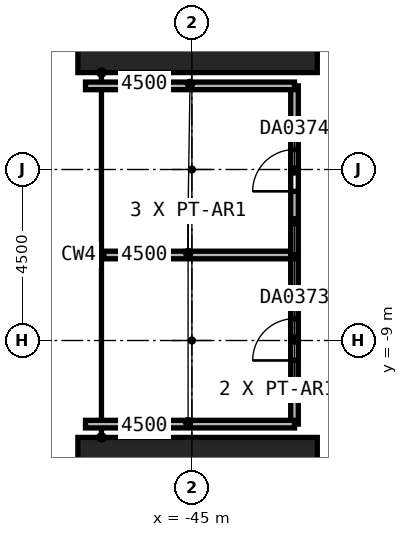
"""IFC4 building model, lengths in metres.
Left out: names, types, materials, properties, quantities, classifications, styles, units other than length and angle.
Written with IfcOpenShell. Run it as: python <this file> out.ifc"""

import sys

from ifc_helpers import new_model, si_unit, direction, frame, frame_2d, origin, origin_2d, place, context, subcontext, project, spatial, rectangle, extrude, element, fill, save


model = new_model("IFC4")
c1 = context("Model", 3, precision=1e-05, world=origin(), true_north=direction((0.0, 1.0)))
c2 = subcontext(c1, "Body", "Model", "MODEL_VIEW")
j1 = project(units=[si_unit("LENGTHUNIT", "METRE"), si_unit("PLANEANGLEUNIT", "RADIAN")], contexts=[c1])
p1 = place(None, origin())
s1 = spatial("IfcSite", under=j1, at=p1, CompositionType="ELEMENT")
p2 = place(p1, origin())
s2 = spatial("IfcBuilding", under=s1, at=p2, CompositionType="ELEMENT")
p3 = place(p2, frame((0.0, 0.0, 19.0)))
s3 = spatial("IfcBuildingStorey", under=s2, at=p3, CompositionType="ELEMENT", Elevation=19.0)
for number, where, z_axis, x_axis in (
    (1, (-44.85, -13.5, 0.0), (0.0, 0.0, 1.0), (0.0, 1.0, 0.0)),
    (2, (-44.85, 0.0, 0.0), (0.0, 0.0, 1.0), (0.0, 1.0, 0.0)),
):
    element("IfcColumn", number, at=place(p3, frame(where, z_axis=z_axis, x_axis=x_axis)), inside=s3, PredefinedType="COLUMN", context=c2, shape_type="SweptSolid", body=[
        extrude(rectangle(XDim=3.9, YDim=6.3, at=origin_2d()), origin(), (0.0, 0.0, 1.0), 6.0),
    ])
p4 = place(p3, frame((-42.3, -11.2, 0.0), z_axis=(0.0, 0.0, 1.0), x_axis=(0.0, 1.0, 0.0)))
e3 = element("IfcWall", 3, at=p4, inside=s3, PredefinedType="PARTITIONING", context=c2, shape_type="SweptSolid", body=[
    extrude(rectangle(XDim=4.45, YDim=0.2, at=frame_2d((2.225, 0.0))), origin(), (0.0, 0.0, 1.0), 4.5),
])
p5 = place(p4, frame((1.675, 0.0, 0.0)))
e4 = element("IfcOpeningElement", 4, at=p5, cuts=e3, PredefinedType="OPENING", context=c2, shape_type="SweptSolid", body=[
    extrude(rectangle(XDim=1.1, YDim=2.4, at=frame_2d((0.55, 1.2))), frame((0.0, 0.1, 0.0), z_axis=(0.0, -1.0, 0.0), x_axis=(1.0, 0.0, 0.0)), (0.0, 0.0, 1.0), 0.2),
])
for number, where, z_axis, x_axis in (
    (5, (-42.3, -11.2, 0.0), (0.0, 0.0, 1.0), (-1.0, 0.0, 0.0)),
    (6, (-47.8, -6.75, 0.0), (0.0, 0.0, 1.0), (1.0, 0.0, 0.0)),
):
    element("IfcWall", number, at=place(p3, frame(where, z_axis=z_axis, x_axis=x_axis)), inside=s3, PredefinedType="PARTITIONING", context=c2, shape_type="SweptSolid", body=[
        extrude(rectangle(XDim=5.5, YDim=0.2, at=frame_2d((2.75, 0.0))), origin(), (0.0, 0.0, 1.0), 5.7),
    ])
p6 = place(p3, frame((-42.3, -6.75, 0.0), z_axis=(0.0, 0.0, 1.0), x_axis=(0.0, 1.0, 0.0)))
e7 = element("IfcWall", 7, at=p6, inside=s3, PredefinedType="PARTITIONING", context=c2, shape_type="SweptSolid", body=[
    extrude(rectangle(XDim=4.45, YDim=0.2, at=frame_2d((2.225, 0.0))), origin(), (0.0, 0.0, 1.0), 4.5),
])
p7 = place(p6, frame((1.675, 0.0, 0.0)))
e8 = element("IfcOpeningElement", 8, at=p7, cuts=e7, PredefinedType="OPENING", context=c2, shape_type="SweptSolid", body=[
    extrude(rectangle(XDim=1.1, YDim=2.4, at=frame_2d((0.55, 1.2))), frame((0.0, 0.1, 0.0), z_axis=(0.0, -1.0, 0.0), x_axis=(1.0, 0.0, 0.0)), (0.0, 0.0, 1.0), 0.2),
])
p8 = place(p3, frame((-42.3, -2.3, 0.0), z_axis=(0.0, 0.0, 1.0), x_axis=(-1.0, 0.0, 0.0)))
e9 = element("IfcWall", 9, at=p8, inside=s3, PredefinedType="PARTITIONING", context=c2, shape_type="SweptSolid", body=[
    extrude(rectangle(XDim=5.5, YDim=0.2, at=frame_2d((2.75, 0.0))), origin(), (0.0, 0.0, 1.0), 5.7),
])
p9 = place(p5, origin())
e10 = element("IfcDoor", 10, at=p9, inside=s3, OperationType="DOUBLE_DOOR_SINGLE_SWING", PredefinedType="DOOR", context=c2, shape_type="SweptSolid", body=[
    extrude(rectangle(XDim=1.1, YDim=2.4, at=frame_2d((0.55, 1.2))), frame((0.0, 0.025, 0.0), z_axis=(0.0, -1.0, 0.0), x_axis=(1.0, 0.0, 0.0)), (0.0, 0.0, 1.0), 0.05),
])
fill(e4, e10)
p10 = place(p7, origin())
e11 = element("IfcDoor", 11, at=p10, inside=s3, OperationType="DOUBLE_DOOR_SINGLE_SWING", PredefinedType="DOOR", context=c2, shape_type="SweptSolid", body=[
    extrude(rectangle(XDim=1.1, YDim=2.4, at=frame_2d((0.55, 1.2))), frame((0.0, 0.025, 0.0), z_axis=(0.0, -1.0, 0.0), x_axis=(1.0, 0.0, 0.0)), (0.0, 0.0, 1.0), 0.05),
])
fill(e8, e11)
save(model, sys.argv[1])
